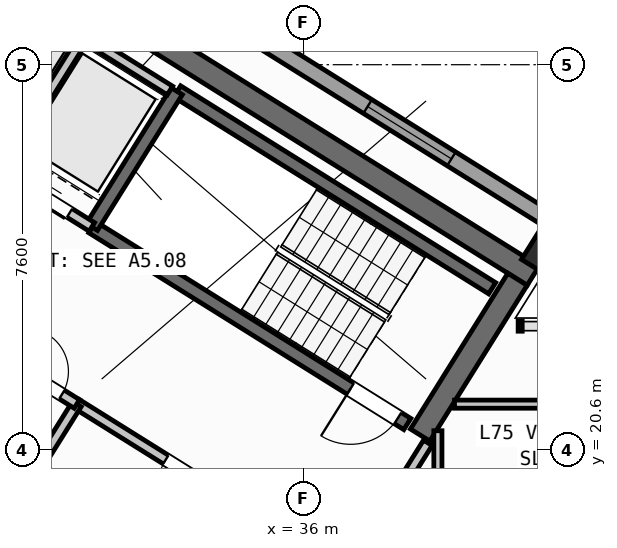
"""IFC4 building model, lengths in metres.
Left out: names, types, materials, properties, quantities, classifications, styles, units other than length and angle.
Written with IfcOpenShell. Run it as: python <this file> out.ifc"""

import sys

from ifc_helpers import new_model, si_unit, direction, frame, frame_2d, origin, origin_2d, place, context, subcontext, project, spatial, rectangle, hollow_rectangle, extrude, source, transform, mapped, element, fill, save


model = new_model("IFC4")
c1 = context("Model", 3, precision=1e-05, world=origin(), true_north=direction((0.0, 1.0)))
c2 = subcontext(c1, "Body", "Model", "MODEL_VIEW")
j1 = project(units=[si_unit("LENGTHUNIT", "METRE"), si_unit("PLANEANGLEUNIT", "RADIAN")], contexts=[c1])
p1 = place(None, origin())
s1 = spatial("IfcSite", under=j1, at=p1, CompositionType="ELEMENT")
p2 = place(p1, origin())
s2 = spatial("IfcBuilding", under=s1, at=p2, CompositionType="ELEMENT")
p3 = place(p2, frame((0.0, 0.0, 295.2)))
s3 = spatial("IfcBuildingStorey", under=s2, at=p3, CompositionType="ELEMENT", Elevation=295.2)
p4 = place(p3, frame((40.531, 24.036, 0.0), z_axis=(0.0, 0.0, 1.0), x_axis=(-0.848048787466, 0.529918157905, 0.0)))
e1 = element("IfcWall", 1, at=p4, inside=s3, PredefinedType="SHEAR", context=c2, shape_type="SweptSolid", body=[
    extrude(rectangle(XDim=13.04, YDim=0.45, at=frame_2d((6.52, 0.0))), origin(), (0.0, 0.0, 1.0), 3.32),
])
p5 = place(p3, frame((40.221, 23.965, 0.0), z_axis=(0.0, 0.0, 1.0), x_axis=(-0.529902075036, -0.848058836916, 0.0)))
e2 = element("IfcWall", 2, at=p5, inside=s3, PredefinedType="SHEAR", context=c2, shape_type="SweptSolid", body=[
    extrude(rectangle(XDim=3.625, YDim=0.45, at=frame_2d((1.812, 0.0))), origin(), (0.0, 0.0, 1.0), 3.32),
])
m1 = source(origin(), c2, "Body", "SweptSolid", [
    extrude(hollow_rectangle(XDim=0.7, YDim=0.7, WallThickness=0.028, at=origin_2d()), origin(), (0.0, 0.0, 1.0), 3.6),
])
p6 = place(p3, frame((40.783, 24.469, 0.0), z_axis=(0.0, 0.0, 1.0), x_axis=(-0.848048096156, 0.529919264233, 0.0)))
e3 = element("IfcColumn", 3, at=p6, inside=s3, PredefinedType="COLUMN", context=c2, shape_type="MappedRepresentation", body=[
    mapped(m1, transform((0.0, 0.0, 0.0), scale=1.0)),
])
p7 = place(p3, frame((19.566, 38.434, 0.0), z_axis=(0.0, 0.0, 1.0), x_axis=(0.84804567626, -0.529923136858, 0.0)))
e4 = element("IfcWall", 4, at=p7, inside=s3, PredefinedType="STANDARD", context=c2, shape_type="SweptSolid", body=[
    extrude(rectangle(XDim=25.188, YDim=0.32, at=frame_2d((12.594, 0.0))), origin(), (0.0, 0.0, 1.0), 3.32),
])
p8 = place(p7, frame((3.55, 0.0, 0.0)))
e5 = element("IfcOpeningElement", 5, at=p8, cuts=e4, PredefinedType="OPENING", context=c2, shape_type="SweptSolid", body=[
    extrude(rectangle(XDim=1.05, YDim=2.15, at=frame_2d((0.525, 1.075))), frame((0.0, 0.17, 0.0), z_axis=(0.0, -1.0, 0.0), x_axis=(1.0, 0.0, 0.0)), (0.0, 0.0, 1.0), 0.34),
])
p9 = place(p7, frame((7.349, 0.0, 0.9)))
e6 = element("IfcOpeningElement", 6, at=p9, cuts=e4, PredefinedType="OPENING", context=c2, shape_type="SweptSolid", body=[
    extrude(rectangle(XDim=1.65, YDim=1.45, at=frame_2d((0.825, 0.725))), frame((0.0, 0.17, 0.0), z_axis=(0.0, -1.0, 0.0), x_axis=(1.0, 0.0, 0.0)), (0.0, 0.0, 1.0), 0.34),
])
p10 = place(p7, frame((10.754, 0.0, 1.0)))
e7 = element("IfcOpeningElement", 7, at=p10, cuts=e4, PredefinedType="OPENING", context=c2, shape_type="SweptSolid", body=[
    extrude(rectangle(XDim=0.9, YDim=1.25, at=frame_2d((0.45, 0.625))), frame((0.0, 0.17, 0.0), z_axis=(0.0, -1.0, 0.0), x_axis=(1.0, 0.0, 0.0)), (0.0, 0.0, 1.0), 0.34),
])
p11 = place(p7, frame((15.169, 0.0, 0.95)))
e8 = element("IfcOpeningElement", 8, at=p11, cuts=e4, PredefinedType="OPENING", context=c2, shape_type="SweptSolid", body=[
    extrude(rectangle(XDim=1.95, YDim=1.35, at=frame_2d((0.975, 0.675))), frame((0.0, 0.17, 0.0), z_axis=(0.0, -1.0, 0.0), x_axis=(1.0, 0.0, 0.0)), (0.0, 0.0, 1.0), 0.34),
])
p12 = place(p7, frame((20.869, 0.0, 0.95)))
e9 = element("IfcOpeningElement", 9, at=p12, cuts=e4, PredefinedType="OPENING", context=c2, shape_type="SweptSolid", body=[
    extrude(rectangle(XDim=1.95, YDim=1.35, at=frame_2d((0.975, 0.675))), frame((0.0, 0.17, 0.0), z_axis=(0.0, -1.0, 0.0), x_axis=(1.0, 0.0, 0.0)), (0.0, 0.0, 1.0), 0.34),
])
p13 = place(p3, frame((31.28, 18.261, 0.0), z_axis=(0.0, 0.0, 1.0), x_axis=(-0.848051618787, 0.529913626805, 0.0)))
e10 = element("IfcWall", 10, at=p13, inside=s3, PredefinedType="SHEAR", context=c2, shape_type="SweptSolid", body=[
    extrude(rectangle(XDim=7.46, YDim=0.26, at=frame_2d((3.73, 0.0))), origin(), (0.0, 0.0, 1.0), 3.32),
])
p14 = place(p13, frame((0.36, 0.0, 0.0)))
e11 = element("IfcOpeningElement", 11, at=p14, cuts=e10, PredefinedType="OPENING", context=c2, shape_type="SweptSolid", body=[
    extrude(rectangle(XDim=0.86, YDim=2.05, at=frame_2d((0.43, 1.025))), frame((0.0, 0.14, 0.0), z_axis=(0.0, -1.0, 0.0), x_axis=(1.0, 0.0, 0.0)), (0.0, 0.0, 1.0), 0.28),
])
p15 = place(p3, frame((39.721, 23.788, 0.0), z_axis=(0.0, 0.0, 1.0), x_axis=(-0.848054434086, 0.529909121291, 0.0)))
e12 = element("IfcWall", 12, at=p15, inside=s3, PredefinedType="SHEAR", context=c2, shape_type="SweptSolid", body=[
    extrude(rectangle(XDim=7.33, YDim=0.26, at=frame_2d((3.665, 0.0))), origin(), (0.0, 0.0, 1.0), 3.32),
])
p16 = place(p3, frame((38.046, 21.108, 0.0), z_axis=(0.0, 0.0, 1.0), x_axis=(-0.848054434086, 0.529909121291, 0.0)))
e13 = element("IfcWall", 13, at=p16, inside=s3, PredefinedType="SHEAR", context=c2, shape_type="SweptSolid", body=[
    extrude(rectangle(XDim=7.33, YDim=0.26, at=frame_2d((3.665, 0.0))), origin(), (0.0, 0.0, 1.0), 3.32),
])
p17 = place(p16, frame((0.22, 0.0, 0.0)))
e14 = element("IfcOpeningElement", 14, at=p17, cuts=e13, PredefinedType="OPENING", context=c2, shape_type="SweptSolid", body=[
    extrude(rectangle(XDim=1.1, YDim=2.1, at=frame_2d((0.55, 1.05))), frame((0.0, 0.14, 0.0), z_axis=(0.0, -1.0, 0.0), x_axis=(1.0, 0.0, 0.0)), (0.0, 0.0, 1.0), 0.28),
])
p18 = place(p3, frame((33.496, 27.677, 0.0), z_axis=(0.0, 0.0, 1.0), x_axis=(-0.529908658664, -0.84805472316, 0.0)))
e15 = element("IfcWall", 15, at=p18, inside=s3, PredefinedType="SHEAR", context=c2, shape_type="SweptSolid", body=[
    extrude(rectangle(XDim=3.16, YDim=0.26, at=frame_2d((1.58, 0.0))), origin(), (0.0, 0.0, 1.0), 3.32),
])
p19 = place(p3, frame((36.459, 18.421, 0.0), z_axis=(0.0, 0.0, 1.0), x_axis=(-0.848059591691, 0.529900867089, 0.0)))
e16 = element("IfcWall", 16, at=p19, inside=s3, PredefinedType="STANDARD", context=c2, shape_type="SweptSolid", body=[
    extrude(rectangle(XDim=5.818, YDim=0.2, at=frame_2d((2.909, 0.0))), origin(), (0.0, 0.0, 1.0), 3.31),
])
p20 = place(p19, frame((2.598, 0.0, 0.0)))
e17 = element("IfcOpeningElement", 17, at=p20, cuts=e16, PredefinedType="OPENING", context=c2, shape_type="SweptSolid", body=[
    extrude(rectangle(XDim=1.15, YDim=2.1, at=frame_2d((0.575, 1.05))), frame((0.0, 0.11, 0.0), z_axis=(0.0, -1.0, 0.0), x_axis=(1.0, 0.0, 0.0)), (0.0, 0.0, 1.0), 0.22),
])
p21 = place(p3, frame((31.822, 24.998, 0.0), z_axis=(0.0, 0.0, 1.0), x_axis=(-0.848054125777, 0.529909614701, 0.0)))
e18 = element("IfcWall", 18, at=p21, inside=s3, PredefinedType="STANDARD", context=c2, shape_type="SweptSolid", body=[
    extrude(rectangle(XDim=4.668, YDim=0.2, at=frame_2d((2.334, 0.0))), origin(), (0.0, 0.0, 1.0), 3.31),
])
p22 = place(p21, frame((0.52, 0.0, 0.0)))
e19 = element("IfcOpeningElement", 19, at=p22, cuts=e18, PredefinedType="OPENING", context=c2, shape_type="SweptSolid", body=[
    extrude(rectangle(XDim=1.2, YDim=2.15, at=frame_2d((0.6, 1.075))), frame((0.0, 0.11, 0.0), z_axis=(0.0, -1.0, 0.0), x_axis=(1.0, 0.0, 0.0)), (0.0, 0.0, 1.0), 0.22),
])
p23 = place(p21, frame((2.54, 0.0, 0.0)))
e20 = element("IfcOpeningElement", 20, at=p23, cuts=e18, PredefinedType="OPENING", context=c2, shape_type="SweptSolid", body=[
    extrude(rectangle(XDim=1.2, YDim=2.15, at=frame_2d((0.6, 1.075))), frame((0.0, 0.11, 0.0), z_axis=(0.0, -1.0, 0.0), x_axis=(1.0, 0.0, 0.0)), (0.0, 0.0, 1.0), 0.22),
])
p24 = place(p3, frame((31.645, 28.716, 0.0), z_axis=(0.0, 0.0, 1.0), x_axis=(-0.52986693015, -0.848080795876, 0.0)))
e21 = element("IfcWall", 21, at=p24, inside=s3, PredefinedType="STANDARD", context=c2, shape_type="SweptSolid", body=[
    extrude(rectangle(XDim=2.66, YDim=0.2, at=frame_2d((1.33, 0.0))), origin(), (0.0, 0.0, 1.0), 3.31),
])
p25 = place(p3, frame((33.363, 27.69, 0.0), z_axis=(0.0, 0.0, 1.0), x_axis=(-0.84804957148, 0.529916903215, 0.0)))
e22 = element("IfcWall", 22, at=p25, inside=s3, PredefinedType="STANDARD", context=c2, shape_type="SweptSolid", body=[
    extrude(rectangle(XDim=4.548, YDim=0.2, at=frame_2d((2.274, 0.0))), origin(), (0.0, 0.0, 1.0), 3.31),
])
p26 = place(p3, frame((31.525, 21.504, 0.0), z_axis=(0.0, 0.0, 1.0), x_axis=(-0.529907497854, -0.848055448493, 0.0)))
e23 = element("IfcWall", 23, at=p26, inside=s3, PredefinedType="STANDARD", context=c2, shape_type="SweptSolid", body=[
    extrude(rectangle(XDim=2.88, YDim=0.2, at=frame_2d((1.44, 0.0))), origin(), (0.0, 0.0, 1.0), 3.31),
])
p27 = place(p3, frame((31.525, 21.504, 0.0), z_axis=(0.0, 0.0, 1.0), x_axis=(-0.848042066329, 0.529928913853, 0.0)))
e24 = element("IfcWall", 24, at=p27, inside=s3, PredefinedType="STANDARD", context=c2, shape_type="SweptSolid", body=[
    extrude(rectangle(XDim=6.268, YDim=0.2, at=frame_2d((3.134, 0.0))), origin(), (0.0, 0.0, 1.0), 3.31),
])
p28 = place(p27, frame((4.4, 0.0, 0.0)))
e25 = element("IfcOpeningElement", 25, at=p28, cuts=e24, PredefinedType="OPENING", context=c2, shape_type="SweptSolid", body=[
    extrude(rectangle(XDim=0.86, YDim=2.05, at=frame_2d((0.43, 1.025))), frame((0.0, 0.11, 0.0), z_axis=(0.0, -1.0, 0.0), x_axis=(1.0, 0.0, 0.0)), (0.0, 0.0, 1.0), 0.22),
])
p29 = place(p27, frame((0.35, 0.0, 0.0)))
e26 = element("IfcOpeningElement", 26, at=p29, cuts=e24, PredefinedType="OPENING", context=c2, shape_type="SweptSolid", body=[
    extrude(rectangle(XDim=0.86, YDim=2.05, at=frame_2d((0.43, 1.025))), frame((0.0, 0.11, 0.0), z_axis=(0.0, -1.0, 0.0), x_axis=(1.0, 0.0, 0.0)), (0.0, 0.0, 1.0), 0.22),
])
p30 = place(p3, frame((38.451, 20.737, 0.0), z_axis=(0.0, 0.0, 1.0), x_axis=(-0.529924799939, -0.848044637038, 0.0)))
e27 = element("IfcWall", 27, at=p30, inside=s3, PredefinedType="STANDARD", context=c2, shape_type="SweptSolid", body=[
    extrude(rectangle(XDim=2.96, YDim=0.2, at=frame_2d((1.48, 0.0))), origin(), (0.0, 0.0, 1.0), 3.31),
])
p31 = place(p30, frame((1.46, 0.0, 0.0)))
e28 = element("IfcOpeningElement", 28, at=p31, cuts=e27, PredefinedType="OPENING", context=c2, shape_type="SweptSolid", body=[
    extrude(rectangle(XDim=0.86, YDim=2.05, at=frame_2d((0.43, 1.025))), frame((0.0, 0.11, 0.0), z_axis=(0.0, -1.0, 0.0), x_axis=(1.0, 0.0, 0.0)), (0.0, 0.0, 1.0), 0.22),
])
p32 = place(p3, frame((38.65, 17.93, 0.0), z_axis=(0.0, 0.0, 1.0), x_axis=(0.0, 1.0, 0.0)))
e29 = element("IfcWall", 29, at=p32, inside=s3, PredefinedType="PARTITIONING", context=c2, shape_type="SweptSolid", body=[
    extrude(rectangle(XDim=3.046, YDim=0.16, at=frame_2d((1.523, 0.0))), origin(), (0.0, 0.0, 1.0), 3.31),
])
p33 = place(p3, frame((38.978, 21.5, 0.0), z_axis=(0.0, 0.0, 1.0), x_axis=(1.0, 0.0, 0.0)))
e30 = element("IfcWall", 30, at=p33, inside=s3, PredefinedType="PARTITIONING", context=c2, shape_type="SweptSolid", body=[
    extrude(rectangle(XDim=3.823, YDim=0.16, at=frame_2d((1.911, 0.0))), origin(), (0.0, 0.0, 1.0), 3.31),
])
m2 = source(origin(), c2, "Body", "SweptSolid", [
    extrude(rectangle(XDim=1.95, YDim=1.35, at=frame_2d((0.975, 0.675))), frame((0.0, 0.03, 0.0), z_axis=(0.0, -1.0, 0.0), x_axis=(1.0, 0.0, 0.0)), (0.0, 0.0, 1.0), 0.06),
])
p34 = place(p12, origin())
e31 = element("IfcWindow", 31, at=p34, inside=s3, PartitioningType="SINGLE_PANEL", PredefinedType="WINDOW", context=c2, shape_type="MappedRepresentation", body=[
    mapped(m2, transform((0.0, 0.0, 0.0), scale=1.0)),
])
fill(e9, e31)
m3 = source(origin(), c2, "Body", "SweptSolid", [
    extrude(rectangle(XDim=1.1, YDim=2.1, at=frame_2d((0.55, 1.05))), frame((0.0, 0.025, 0.0), z_axis=(0.0, -1.0, 0.0), x_axis=(1.0, 0.0, 0.0)), (0.0, 0.0, 1.0), 0.05),
])
p35 = place(p17, origin())
e32 = element("IfcDoor", 32, at=p35, inside=s3, OperationType="SINGLE_SWING_RIGHT", PredefinedType="DOOR", context=c2, shape_type="MappedRepresentation", body=[
    mapped(m3, transform((0.0, 0.0, 0.0), scale=1.0)),
])
fill(e14, e32)
m4 = source(origin(), c2, "Body", "SweptSolid", [
    extrude(rectangle(XDim=1.15, YDim=2.1, at=frame_2d((0.575, 1.05))), frame((0.0, 0.025, 0.0), z_axis=(0.0, -1.0, 0.0), x_axis=(1.0, 0.0, 0.0)), (0.0, 0.0, 1.0), 0.05),
])
p36 = place(p20, origin())
e33 = element("IfcDoor", 33, at=p36, inside=s3, OperationType="SINGLE_SWING_LEFT", PredefinedType="DOOR", context=c2, shape_type="MappedRepresentation", body=[
    mapped(m4, transform((0.0, 0.0, 0.0), scale=1.0)),
])
fill(e17, e33)
m5 = source(origin(), c2, "Body", "SweptSolid", [
    extrude(rectangle(XDim=1.2, YDim=2.15, at=frame_2d((0.6, 1.075))), frame((0.0, 0.025, 0.0), z_axis=(0.0, -1.0, 0.0), x_axis=(1.0, 0.0, 0.0)), (0.0, 0.0, 1.0), 0.05),
])
p37 = place(p22, origin())
e34 = element("IfcDoor", 34, at=p37, inside=s3, OperationType="DOUBLE_DOOR_SLIDING", PredefinedType="DOOR", context=c2, shape_type="MappedRepresentation", body=[
    mapped(m5, transform((0.0, 0.0, 0.0), scale=1.0)),
])
fill(e19, e34)
m6 = source(origin(), c2, "Body", "SweptSolid", [
    extrude(rectangle(XDim=0.86, YDim=2.05, at=frame_2d((0.43, 1.025))), frame((0.0, 0.025, 0.0), z_axis=(0.0, -1.0, 0.0), x_axis=(1.0, 0.0, 0.0)), (0.0, 0.0, 1.0), 0.05),
])
p38 = place(p29, frame((0.86, 0.0, 0.0), z_axis=(0.0, 0.0, 1.0), x_axis=(-1.0, 0.0, 0.0)))
e35 = element("IfcDoor", 35, at=p38, inside=s3, OperationType="SINGLE_SWING_LEFT", PredefinedType="DOOR", context=c2, shape_type="MappedRepresentation", body=[
    mapped(m6, transform((0.0, 0.0, 0.0), scale=1.0)),
])
fill(e26, e35)
save(model, sys.argv[1])
